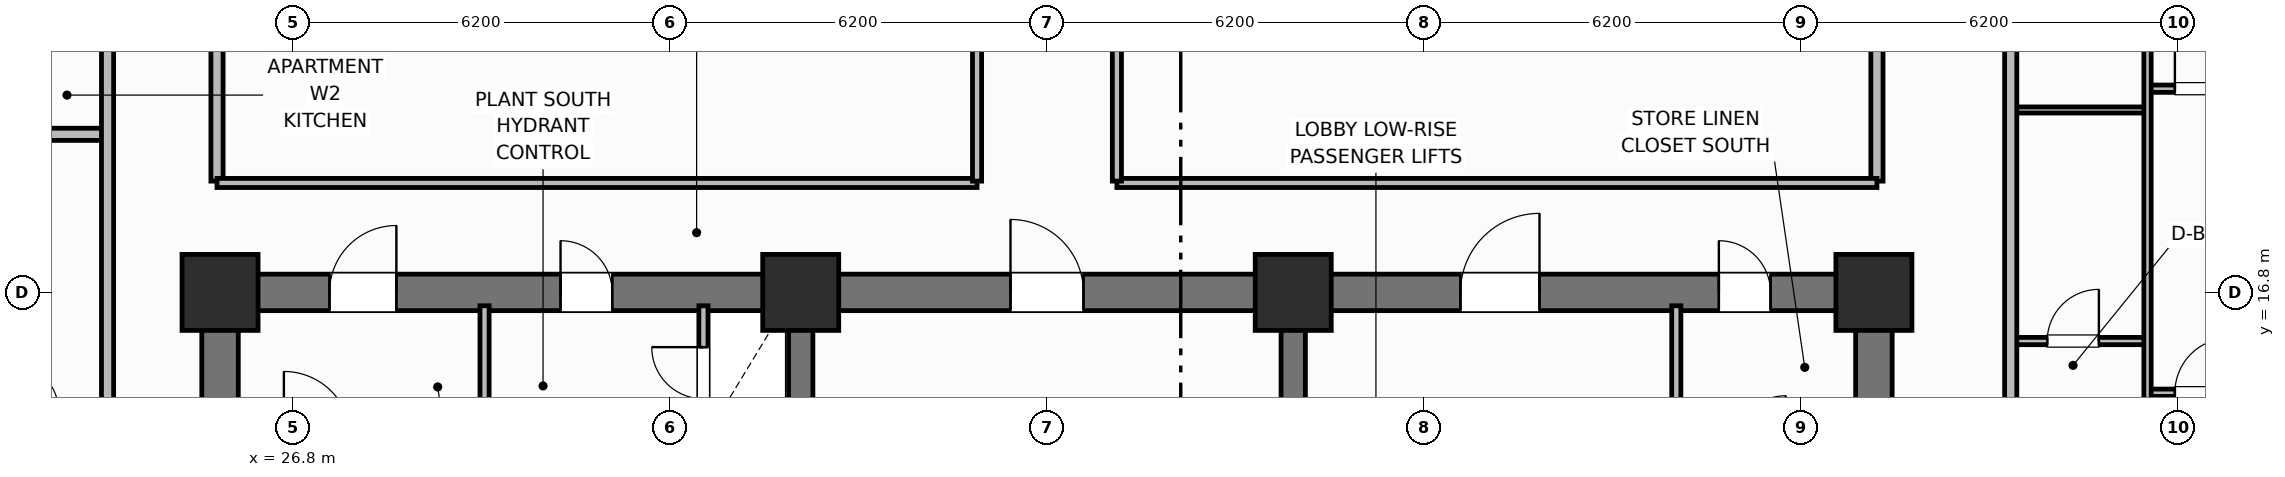
"""IFC4 building model, lengths in metres.
Left out: names, types, materials, properties, quantities, classifications, styles, units other than length and angle.
Written with IfcOpenShell. Run it as: python <this file> out.ifc"""

import sys

from ifc_helpers import new_model, si_unit, direction, frame, frame_2d, origin, origin_2d, place, context, subcontext, project, spatial, rectangle, extrude, element, fill, save


model = new_model("IFC4")
c1 = context("Model", 3, precision=1e-05, world=origin(), true_north=direction((0.0, 1.0)))
c2 = subcontext(c1, "Body", "Model", "MODEL_VIEW")
j1 = project(units=[si_unit("LENGTHUNIT", "METRE"), si_unit("PLANEANGLEUNIT", "RADIAN")], contexts=[c1])
p1 = place(None, origin())
s1 = spatial("IfcSite", under=j1, at=p1, CompositionType="ELEMENT")
p2 = place(p1, origin())
s2 = spatial("IfcBuilding", under=s1, at=p2, CompositionType="ELEMENT")
p3 = place(p2, frame((0.0, 0.0, 47.3)))
s3 = spatial("IfcBuildingStorey", under=s2, at=p3, CompositionType="ELEMENT", Elevation=47.3)
for number, where, z_axis, x_axis in (
    (1, (25.6, 10.9, 0.0), (0.0, 0.0, 1.0), (0.0, 1.0, 0.0)),
    (2, (52.8, 10.9, 0.0), (0.0, 0.0, 1.0), (0.0, 1.0, 0.0)),
):
    element("IfcWall", number, at=place(p3, frame(where, z_axis=z_axis, x_axis=x_axis)), inside=s3, PredefinedType="SHEAR", context=c2, shape_type="SweptSolid", body=[
        extrude(rectangle(XDim=5.6, YDim=0.6, at=frame_2d((2.8, 0.0))), origin(), (0.0, 0.0, 1.0), 3.7),
    ])
p4 = place(p3, frame((25.6, 16.8, 0.0), z_axis=(0.0, 0.0, 1.0), x_axis=(1.0, 0.0, 0.0)))
e3 = element("IfcWall", 3, at=p4, inside=s3, PredefinedType="SHEAR", context=c2, shape_type="SweptSolid", body=[
    extrude(rectangle(XDim=27.2, YDim=0.6, at=frame_2d((13.6, 0.0))), origin(), (0.0, 0.0, 1.0), 3.7),
])
p5 = place(p4, frame((1.8, 0.0, 0.0)))
e4 = element("IfcOpeningElement", 4, at=p5, cuts=e3, PredefinedType="OPENING", context=c2, shape_type="SweptSolid", body=[
    extrude(rectangle(XDim=1.1, YDim=2.15, at=frame_2d((0.55, 1.075))), frame((0.0, 0.31, 0.0), z_axis=(0.0, -1.0, 0.0), x_axis=(1.0, 0.0, 0.0)), (0.0, 0.0, 1.0), 0.62),
])
p6 = place(p4, frame((5.6, 0.0, 0.0)))
e5 = element("IfcOpeningElement", 5, at=p6, cuts=e3, PredefinedType="OPENING", context=c2, shape_type="SweptSolid", body=[
    extrude(rectangle(XDim=0.85, YDim=2.1, at=frame_2d((0.425, 1.05))), frame((0.0, 0.31, 0.0), z_axis=(0.0, -1.0, 0.0), x_axis=(1.0, 0.0, 0.0)), (0.0, 0.0, 1.0), 0.62),
])
p7 = place(p4, frame((13.0, 0.0, 0.0)))
e6 = element("IfcOpeningElement", 6, at=p7, cuts=e3, PredefinedType="OPENING", context=c2, shape_type="SweptSolid", body=[
    extrude(rectangle(XDim=1.2, YDim=2.15, at=frame_2d((0.6, 1.075))), frame((0.0, 0.31, 0.0), z_axis=(0.0, -1.0, 0.0), x_axis=(1.0, 0.0, 0.0)), (0.0, 0.0, 1.0), 0.62),
])
p8 = place(p4, frame((20.4, 0.0, 0.0)))
e7 = element("IfcOpeningElement", 7, at=p8, cuts=e3, PredefinedType="OPENING", context=c2, shape_type="SweptSolid", body=[
    extrude(rectangle(XDim=1.3, YDim=2.2, at=frame_2d((0.65, 1.1))), frame((0.0, 0.31, 0.0), z_axis=(0.0, -1.0, 0.0), x_axis=(1.0, 0.0, 0.0)), (0.0, 0.0, 1.0), 0.62),
])
p9 = place(p4, frame((24.65, 0.0, 0.0)))
e8 = element("IfcOpeningElement", 8, at=p9, cuts=e3, PredefinedType="OPENING", context=c2, shape_type="SweptSolid", body=[
    extrude(rectangle(XDim=0.85, YDim=2.1, at=frame_2d((0.425, 1.05))), frame((0.0, 0.31, 0.0), z_axis=(0.0, -1.0, 0.0), x_axis=(1.0, 0.0, 0.0)), (0.0, 0.0, 1.0), 0.62),
])
for number, where, z_axis, x_axis in (
    (9, (35.15, 10.9, 0.0), (0.0, 0.0, 1.0), (0.0, 1.0, 0.0)),
    (10, (43.25, 10.9, 0.0), (0.0, 0.0, 1.0), (0.0, 1.0, 0.0)),
):
    element("IfcWall", number, at=place(p3, frame(where, z_axis=z_axis, x_axis=x_axis)), inside=s3, PredefinedType="SHEAR", context=c2, shape_type="SweptSolid", body=[
        extrude(rectangle(XDim=5.6, YDim=0.4, at=frame_2d((2.8, 0.0))), origin(), (0.0, 0.0, 1.0), 3.7),
    ])
for number, where, z_axis, x_axis in (
    (11, (25.6, 16.8, 0.0), (0.0, 0.0, 1.0), (1.0, 0.0, 0.0)),
    (12, (35.15, 16.8, 0.0), (0.0, 0.0, 1.0), (1.0, 0.0, 0.0)),
    (13, (43.25, 16.8, 0.0), (0.0, 0.0, 1.0), (1.0, 0.0, 0.0)),
    (14, (52.8, 16.8, 0.0), (0.0, 0.0, 1.0), (1.0, 0.0, 0.0)),
):
    element("IfcColumn", number, at=place(p3, frame(where, z_axis=z_axis, x_axis=x_axis)), inside=s3, PredefinedType="COLUMN", context=c2, shape_type="SweptSolid", body=[
        extrude(rectangle(XDim=1.25, YDim=1.25, at=origin_2d()), origin(), (0.0, 0.0, 1.0), 3.7),
    ])
p10 = place(p3, frame((29.95, 14.5, 0.0), z_axis=(0.0, 0.0, 1.0), x_axis=(0.0, 1.0, 0.0)))
e15 = element("IfcWall", 15, at=p10, inside=s3, PredefinedType="PARTITIONING", context=c2, shape_type="SweptSolid", body=[
    extrude(rectangle(XDim=2.08, YDim=0.15, at=frame_2d((1.04, 0.0))), origin(), (0.0, 0.0, 1.0), 2.53),
])
p11 = place(p3, frame((33.55, 14.5, 0.0), z_axis=(0.0, 0.0, 1.0), x_axis=(0.0, 1.0, 0.0)))
e16 = element("IfcWall", 16, at=p11, inside=s3, PredefinedType="PARTITIONING", context=c2, shape_type="SweptSolid", body=[
    extrude(rectangle(XDim=2.08, YDim=0.15, at=frame_2d((1.04, 0.0))), origin(), (0.0, 0.0, 1.0), 2.53),
])
p12 = place(p11, frame((0.55, 0.0, 0.0)))
e17 = element("IfcOpeningElement", 17, at=p12, cuts=e16, PredefinedType="OPENING", context=c2, shape_type="SweptSolid", body=[
    extrude(rectangle(XDim=0.85, YDim=2.05, at=frame_2d((0.425, 1.025))), frame((0.0, 0.085, 0.0), z_axis=(0.0, -1.0, 0.0), x_axis=(1.0, 0.0, 0.0)), (0.0, 0.0, 1.0), 0.17),
])
p13 = place(p3, frame((49.55, 13.7, 0.0), z_axis=(0.0, 0.0, 1.0), x_axis=(0.0, 1.0, 0.0)))
e18 = element("IfcWall", 18, at=p13, inside=s3, PredefinedType="PARTITIONING", context=c2, shape_type="SweptSolid", body=[
    extrude(rectangle(XDim=2.88, YDim=0.15, at=frame_2d((1.44, 0.0))), origin(), (0.0, 0.0, 1.0), 2.53),
])
for number, where, z_axis, x_axis in (
    (19, (25.55, 18.63, 0.0), (0.0, 0.0, 1.0), (0.0, 1.0, 0.0)),
    (20, (52.85, 18.63, 0.0), (0.0, 0.0, 1.0), (0.0, 1.0, 0.0)),
):
    element("IfcWall", number, at=place(p3, frame(where, z_axis=z_axis, x_axis=x_axis)), inside=s3, PredefinedType="PARTITIONING", context=c2, shape_type="SweptSolid", body=[
        extrude(rectangle(XDim=19.14, YDim=0.2, at=frame_2d((9.57, 0.0))), origin(), (0.0, 0.0, 1.0), 2.53),
    ])
for number, where, z_axis, x_axis in (
    (21, (25.55, 18.6, 0.0), (0.0, 0.0, 1.0), (1.0, 0.0, 0.0)),
    (22, (40.35, 18.6, 0.0), (0.0, 0.0, 1.0), (1.0, 0.0, 0.0)),
):
    element("IfcWall", number, at=place(p3, frame(where, z_axis=z_axis, x_axis=x_axis)), inside=s3, PredefinedType="PARTITIONING", context=c2, shape_type="SweptSolid", body=[
        extrude(rectangle(XDim=12.5, YDim=0.15, at=frame_2d((6.25, 0.0))), origin(), (0.0, 0.0, 1.0), 2.53),
    ])
p14 = place(p3, frame((38.05, 18.63, 0.0), z_axis=(0.0, 0.0, 1.0), x_axis=(0.0, 1.0, 0.0)))
e23 = element("IfcWall", 23, at=p14, inside=s3, PredefinedType="PARTITIONING", context=c2, shape_type="SweptSolid", body=[
    extrude(rectangle(XDim=19.14, YDim=0.15, at=frame_2d((9.57, 0.0))), origin(), (0.0, 0.0, 1.0), 2.53),
])
p15 = place(p14, frame((2.2, 0.0, 0.0)))
e24 = element("IfcOpeningElement", 24, at=p15, cuts=e23, PredefinedType="OPENING", context=c2, shape_type="SweptSolid", body=[
    extrude(rectangle(XDim=1.0, YDim=2.15, at=frame_2d((0.5, 1.075))), frame((0.0, 0.085, 0.0), z_axis=(0.0, -1.0, 0.0), x_axis=(1.0, 0.0, 0.0)), (0.0, 0.0, 1.0), 0.17),
])
p16 = place(p14, frame((10.604, 0.0, 0.0)))
e25 = element("IfcOpeningElement", 25, at=p16, cuts=e23, PredefinedType="OPENING", context=c2, shape_type="SweptSolid", body=[
    extrude(rectangle(XDim=1.0, YDim=2.15, at=frame_2d((0.5, 1.075))), frame((0.0, 0.085, 0.0), z_axis=(0.0, -1.0, 0.0), x_axis=(1.0, 0.0, 0.0)), (0.0, 0.0, 1.0), 0.17),
])
p17 = place(p3, frame((40.35, 18.63, 0.0), z_axis=(0.0, 0.0, 1.0), x_axis=(0.0, 1.0, 0.0)))
e26 = element("IfcWall", 26, at=p17, inside=s3, PredefinedType="PARTITIONING", context=c2, shape_type="SweptSolid", body=[
    extrude(rectangle(XDim=19.14, YDim=0.15, at=frame_2d((9.57, 0.0))), origin(), (0.0, 0.0, 1.0), 2.53),
])
p18 = place(p17, frame((2.2, 0.0, 0.0)))
e27 = element("IfcOpeningElement", 27, at=p18, cuts=e26, PredefinedType="OPENING", context=c2, shape_type="SweptSolid", body=[
    extrude(rectangle(XDim=1.0, YDim=2.15, at=frame_2d((0.5, 1.075))), frame((0.0, 0.085, 0.0), z_axis=(0.0, -1.0, 0.0), x_axis=(1.0, 0.0, 0.0)), (0.0, 0.0, 1.0), 0.17),
])
p19 = place(p17, frame((10.604, 0.0, 0.0)))
e28 = element("IfcOpeningElement", 28, at=p19, cuts=e26, PredefinedType="OPENING", context=c2, shape_type="SweptSolid", body=[
    extrude(rectangle(XDim=0.9, YDim=2.1, at=frame_2d((0.45, 1.05))), frame((0.0, 0.085, 0.0), z_axis=(0.0, -1.0, 0.0), x_axis=(1.0, 0.0, 0.0)), (0.0, 0.0, 1.0), 0.17),
])
p20 = place(p3, frame((14.57, 19.4, 0.0), z_axis=(0.0, 0.0, 1.0), x_axis=(1.0, 0.0, 0.0)))
e29 = element("IfcWall", 29, at=p20, inside=s3, PredefinedType="PARTITIONING", context=c2, shape_type="SweptSolid", body=[
    extrude(rectangle(XDim=9.18, YDim=0.2, at=frame_2d((4.59, 0.0))), origin(), (0.0, 0.0, 1.0), 2.53),
])
p21 = place(p3, frame((23.75, 10.6, 0.0), z_axis=(0.0, 0.0, 1.0), x_axis=(0.0, 1.0, 0.0)))
e30 = element("IfcWall", 30, at=p21, inside=s3, PredefinedType="PARTITIONING", context=c2, shape_type="SweptSolid", body=[
    extrude(rectangle(XDim=35.2, YDim=0.2, at=frame_2d((17.6, 0.0))), origin(), (0.0, 0.0, 1.0), 2.53),
])
p22 = place(p21, frame((2.65, 0.0, 0.0)))
e31 = element("IfcOpeningElement", 31, at=p22, cuts=e30, PredefinedType="OPENING", context=c2, shape_type="SweptSolid", body=[
    extrude(rectangle(XDim=1.0, YDim=2.15, at=frame_2d((0.5, 1.075))), frame((0.0, 0.11, 0.0), z_axis=(0.0, -1.0, 0.0), x_axis=(1.0, 0.0, 0.0)), (0.0, 0.0, 1.0), 0.22),
])
p23 = place(p21, frame((10.81, 0.0, 0.0)))
e32 = element("IfcOpeningElement", 32, at=p23, cuts=e30, PredefinedType="OPENING", context=c2, shape_type="SweptSolid", body=[
    extrude(rectangle(XDim=1.0, YDim=2.15, at=frame_2d((0.5, 1.075))), frame((0.0, 0.11, 0.0), z_axis=(0.0, -1.0, 0.0), x_axis=(1.0, 0.0, 0.0)), (0.0, 0.0, 1.0), 0.22),
])
p24 = place(p21, frame((19.54, 0.0, 0.0)))
e33 = element("IfcOpeningElement", 33, at=p24, cuts=e30, PredefinedType="OPENING", context=c2, shape_type="SweptSolid", body=[
    extrude(rectangle(XDim=1.0, YDim=2.15, at=frame_2d((0.5, 1.075))), frame((0.0, 0.11, 0.0), z_axis=(0.0, -1.0, 0.0), x_axis=(1.0, 0.0, 0.0)), (0.0, 0.0, 1.0), 0.22),
])
p25 = place(p21, frame((26.95, 0.0, 0.0)))
e34 = element("IfcOpeningElement", 34, at=p25, cuts=e30, PredefinedType="OPENING", context=c2, shape_type="SweptSolid", body=[
    extrude(rectangle(XDim=1.0, YDim=2.15, at=frame_2d((0.5, 1.075))), frame((0.0, 0.11, 0.0), z_axis=(0.0, -1.0, 0.0), x_axis=(1.0, 0.0, 0.0)), (0.0, 0.0, 1.0), 0.22),
])
p26 = place(p3, frame((55.05, 16.0, 0.0), z_axis=(0.0, 0.0, 1.0), x_axis=(1.0, 0.0, 0.0)))
e35 = element("IfcWall", 35, at=p26, inside=s3, PredefinedType="PARTITIONING", context=c2, shape_type="SweptSolid", body=[
    extrude(rectangle(XDim=2.25, YDim=0.12, at=frame_2d((1.125, 0.0))), origin(), (0.0, 0.0, 1.0), 2.53),
])
p27 = place(p26, frame((0.6, 0.0, 0.0)))
e36 = element("IfcOpeningElement", 36, at=p27, cuts=e35, PredefinedType="OPENING", context=c2, shape_type="SweptSolid", body=[
    extrude(rectangle(XDim=0.85, YDim=2.1, at=frame_2d((0.425, 1.05))), frame((0.0, 0.07, 0.0), z_axis=(0.0, -1.0, 0.0), x_axis=(1.0, 0.0, 0.0)), (0.0, 0.0, 1.0), 0.14),
])
p28 = place(p3, frame((55.05, 19.8, 0.0), z_axis=(0.0, 0.0, 1.0), x_axis=(1.0, 0.0, 0.0)))
e37 = element("IfcWall", 37, at=p28, inside=s3, PredefinedType="PARTITIONING", context=c2, shape_type="SweptSolid", body=[
    extrude(rectangle(XDim=2.25, YDim=0.1, at=frame_2d((1.125, 0.0))), origin(), (0.0, 0.0, 1.0), 2.53),
])
p29 = place(p3, frame((57.3, 15.15, 0.0), z_axis=(0.0, 0.0, 1.0), x_axis=(1.0, 0.0, 0.0)))
e38 = element("IfcWall", 38, at=p29, inside=s3, PredefinedType="PARTITIONING", context=c2, shape_type="SweptSolid", body=[
    extrude(rectangle(XDim=6.53, YDim=0.12, at=frame_2d((3.265, 0.0))), origin(), (0.0, 0.0, 1.0), 2.53),
])
p30 = place(p29, frame((0.45, 0.0, 0.0)))
e39 = element("IfcOpeningElement", 39, at=p30, cuts=e38, PredefinedType="OPENING", context=c2, shape_type="SweptSolid", body=[
    extrude(rectangle(XDim=0.9, YDim=2.1, at=frame_2d((0.45, 1.05))), frame((0.0, 0.07, 0.0), z_axis=(0.0, -1.0, 0.0), x_axis=(1.0, 0.0, 0.0)), (0.0, 0.0, 1.0), 0.14),
])
p31 = place(p3, frame((57.3, 20.15, 0.0), z_axis=(0.0, 0.0, 1.0), x_axis=(1.0, 0.0, 0.0)))
e40 = element("IfcWall", 40, at=p31, inside=s3, PredefinedType="PARTITIONING", context=c2, shape_type="SweptSolid", body=[
    extrude(rectangle(XDim=6.53, YDim=0.12, at=frame_2d((3.265, 0.0))), origin(), (0.0, 0.0, 1.0), 2.53),
])
p32 = place(p31, frame((0.45, 0.0, 0.0)))
e41 = element("IfcOpeningElement", 41, at=p32, cuts=e40, PredefinedType="OPENING", context=c2, shape_type="SweptSolid", body=[
    extrude(rectangle(XDim=0.9, YDim=2.1, at=frame_2d((0.45, 1.05))), frame((0.0, 0.07, 0.0), z_axis=(0.0, -1.0, 0.0), x_axis=(1.0, 0.0, 0.0)), (0.0, 0.0, 1.0), 0.14),
])
p33 = place(p3, frame((57.3, 10.64, 0.0), z_axis=(0.0, 0.0, 1.0), x_axis=(0.0, 1.0, 0.0)))
e42 = element("IfcWall", 42, at=p33, inside=s3, PredefinedType="PARTITIONING", context=c2, shape_type="SweptSolid", body=[
    extrude(rectangle(XDim=19.12, YDim=0.12, at=frame_2d((9.56, 0.0))), origin(), (0.0, 0.0, 1.0), 2.53),
])
p34 = place(p33, frame((0.41, 0.0, 0.0)))
e43 = element("IfcOpeningElement", 43, at=p34, cuts=e42, PredefinedType="OPENING", context=c2, shape_type="SweptSolid", body=[
    extrude(rectangle(XDim=0.9, YDim=2.1, at=frame_2d((0.45, 1.05))), frame((0.0, 0.07, 0.0), z_axis=(0.0, -1.0, 0.0), x_axis=(1.0, 0.0, 0.0)), (0.0, 0.0, 1.0), 0.14),
])
p35 = place(p33, frame((12.105, 0.0, 0.0)))
e44 = element("IfcOpeningElement", 44, at=p35, cuts=e42, PredefinedType="OPENING", context=c2, shape_type="SweptSolid", body=[
    extrude(rectangle(XDim=0.82, YDim=2.08, at=frame_2d((0.41, 1.04))), frame((0.0, 0.07, 0.0), z_axis=(0.0, -1.0, 0.0), x_axis=(1.0, 0.0, 0.0)), (0.0, 0.0, 1.0), 0.14),
])
p36 = place(p3, frame((55.05, 10.6, 0.0), z_axis=(0.0, 0.0, 1.0), x_axis=(0.0, 1.0, 0.0)))
e45 = element("IfcWall", 45, at=p36, inside=s3, PredefinedType="PARTITIONING", context=c2, shape_type="SweptSolid", body=[
    extrude(rectangle(XDim=35.2, YDim=0.2, at=frame_2d((17.6, 0.0))), origin(), (0.0, 0.0, 1.0), 2.53),
])
p37 = place(p36, frame((2.65, 0.0, 0.0)))
e46 = element("IfcOpeningElement", 46, at=p37, cuts=e45, PredefinedType="OPENING", context=c2, shape_type="SweptSolid", body=[
    extrude(rectangle(XDim=1.0, YDim=2.15, at=frame_2d((0.5, 1.075))), frame((0.0, 0.11, 0.0), z_axis=(0.0, -1.0, 0.0), x_axis=(1.0, 0.0, 0.0)), (0.0, 0.0, 1.0), 0.22),
])
p38 = place(p36, frame((22.75, 0.0, 0.0)))
e47 = element("IfcOpeningElement", 47, at=p38, cuts=e45, PredefinedType="OPENING", context=c2, shape_type="SweptSolid", body=[
    extrude(rectangle(XDim=1.0, YDim=2.15, at=frame_2d((0.5, 1.075))), frame((0.0, 0.11, 0.0), z_axis=(0.0, -1.0, 0.0), x_axis=(1.0, 0.0, 0.0)), (0.0, 0.0, 1.0), 0.22),
])
p39 = place(p12, origin())
e48 = element("IfcDoor", 48, at=p39, inside=s3, OperationType="SINGLE_SWING_RIGHT", PredefinedType="TRAPDOOR", context=c2, shape_type="SweptSolid", body=[
    extrude(rectangle(XDim=0.85, YDim=2.05, at=frame_2d((0.425, 1.025))), frame((0.0, 0.025, 0.0), z_axis=(0.0, -1.0, 0.0), x_axis=(1.0, 0.0, 0.0)), (0.0, 0.0, 1.0), 0.05),
])
fill(e17, e48)
p40 = place(p27, origin())
e49 = element("IfcDoor", 49, at=p40, inside=s3, OperationType="SINGLE_SWING_RIGHT", PredefinedType="DOOR", context=c2, shape_type="SweptSolid", body=[
    extrude(rectangle(XDim=0.85, YDim=2.1, at=frame_2d((0.425, 1.05))), frame((0.0, 0.025, 0.0), z_axis=(0.0, -1.0, 0.0), x_axis=(1.0, 0.0, 0.0)), (0.0, 0.0, 1.0), 0.05),
])
fill(e36, e49)
p41 = place(p30, origin())
e50 = element("IfcDoor", 50, at=p41, inside=s3, OperationType="SINGLE_SWING_RIGHT", PredefinedType="DOOR", context=c2, shape_type="SweptSolid", body=[
    extrude(rectangle(XDim=0.9, YDim=2.1, at=frame_2d((0.45, 1.05))), frame((0.0, 0.025, 0.0), z_axis=(0.0, -1.0, 0.0), x_axis=(1.0, 0.0, 0.0)), (0.0, 0.0, 1.0), 0.05),
])
fill(e39, e50)
p42 = place(p32, origin())
e51 = element("IfcDoor", 51, at=p42, inside=s3, OperationType="SINGLE_SWING_LEFT", PredefinedType="DOOR", context=c2, shape_type="SweptSolid", body=[
    extrude(rectangle(XDim=0.9, YDim=2.1, at=frame_2d((0.45, 1.05))), frame((0.0, 0.025, 0.0), z_axis=(0.0, -1.0, 0.0), x_axis=(1.0, 0.0, 0.0)), (0.0, 0.0, 1.0), 0.05),
])
fill(e41, e51)
p43 = place(p5, origin())
e52 = element("IfcDoor", 52, at=p43, inside=s3, OperationType="SINGLE_SWING_RIGHT", PredefinedType="DOOR", context=c2, shape_type="SweptSolid", body=[
    extrude(rectangle(XDim=1.1, YDim=2.15, at=frame_2d((0.55, 1.075))), frame((0.0, 0.025, 0.0), z_axis=(0.0, -1.0, 0.0), x_axis=(1.0, 0.0, 0.0)), (0.0, 0.0, 1.0), 0.05),
])
fill(e4, e52)
p44 = place(p6, origin())
e53 = element("IfcDoor", 53, at=p44, inside=s3, OperationType="SINGLE_SWING_LEFT", PredefinedType="DOOR", context=c2, shape_type="SweptSolid", body=[
    extrude(rectangle(XDim=0.85, YDim=2.1, at=frame_2d((0.425, 1.05))), frame((0.0, 0.025, 0.0), z_axis=(0.0, -1.0, 0.0), x_axis=(1.0, 0.0, 0.0)), (0.0, 0.0, 1.0), 0.05),
])
fill(e5, e53)
p45 = place(p7, origin())
e54 = element("IfcDoor", 54, at=p45, inside=s3, OperationType="SINGLE_SWING_LEFT", PredefinedType="DOOR", context=c2, shape_type="SweptSolid", body=[
    extrude(rectangle(XDim=1.2, YDim=2.15, at=frame_2d((0.6, 1.075))), frame((0.0, 0.025, 0.0), z_axis=(0.0, -1.0, 0.0), x_axis=(1.0, 0.0, 0.0)), (0.0, 0.0, 1.0), 0.05),
])
fill(e6, e54)
p46 = place(p8, origin())
e55 = element("IfcDoor", 55, at=p46, inside=s3, OperationType="SINGLE_SWING_RIGHT", PredefinedType="DOOR", context=c2, shape_type="SweptSolid", body=[
    extrude(rectangle(XDim=1.3, YDim=2.2, at=frame_2d((0.65, 1.1))), frame((0.0, 0.025, 0.0), z_axis=(0.0, -1.0, 0.0), x_axis=(1.0, 0.0, 0.0)), (0.0, 0.0, 1.0), 0.05),
])
fill(e7, e55)
p47 = place(p9, origin())
e56 = element("IfcDoor", 56, at=p47, inside=s3, OperationType="SINGLE_SWING_LEFT", PredefinedType="DOOR", context=c2, shape_type="SweptSolid", body=[
    extrude(rectangle(XDim=0.85, YDim=2.1, at=frame_2d((0.425, 1.05))), frame((0.0, 0.025, 0.0), z_axis=(0.0, -1.0, 0.0), x_axis=(1.0, 0.0, 0.0)), (0.0, 0.0, 1.0), 0.05),
])
fill(e8, e56)
save(model, sys.argv[1])
